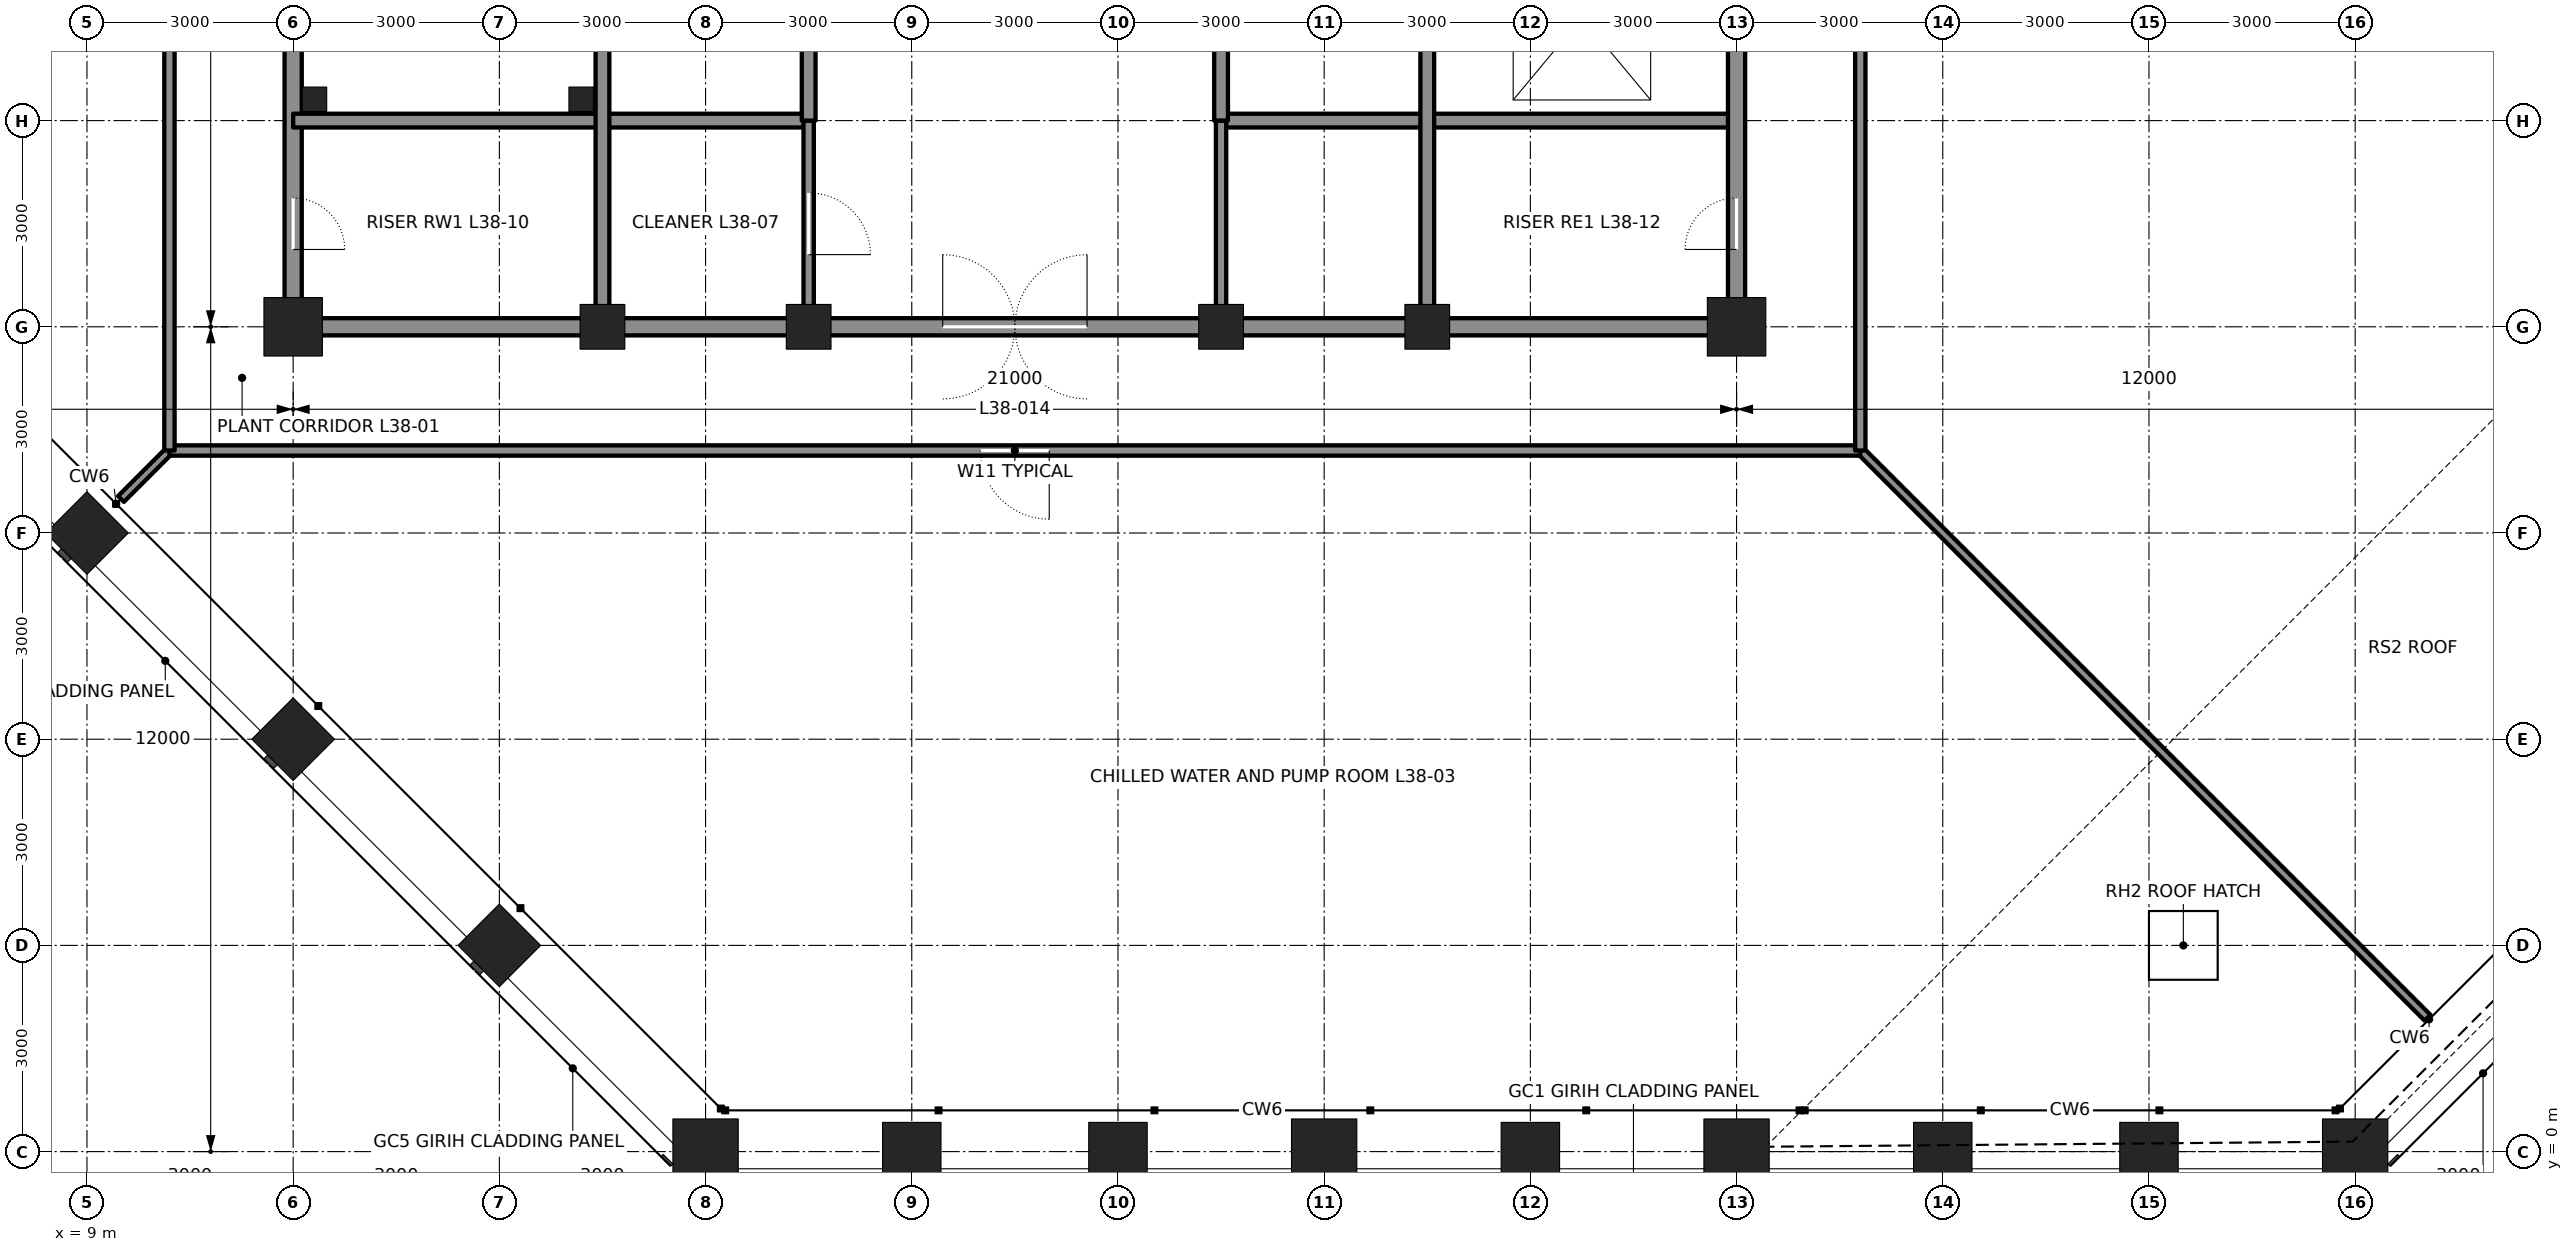
"""IFC4 building model, lengths in metres.
Left out: names, types, materials, properties, quantities, classifications, styles, units other than length and angle.
Written with IfcOpenShell. Run it as: python <this file> out.ifc"""

import sys

from ifc_helpers import new_model, si_unit, direction, frame, frame_2d, origin, origin_2d, place, context, subcontext, project, spatial, rectangle, hollow_rectangle, extrude, element, fill, save


model = new_model("IFC4")
c1 = context("Model", 3, precision=1e-05, world=origin(), true_north=direction((0.0, 1.0)))
c2 = subcontext(c1, "Body", "Model", "MODEL_VIEW")
j1 = project(units=[si_unit("LENGTHUNIT", "METRE"), si_unit("PLANEANGLEUNIT", "RADIAN")], contexts=[c1])
p1 = place(None, origin())
s1 = spatial("IfcSite", under=j1, at=p1, CompositionType="ELEMENT")
p2 = place(p1, origin())
s2 = spatial("IfcBuilding", under=s1, at=p2, CompositionType="ELEMENT")
p3 = place(p2, frame((0.0, 0.0, 174.0)))
s3 = spatial("IfcBuildingStorey", under=s2, at=p3, CompositionType="ELEMENT", Elevation=174.0)
p4 = place(p3, frame((18.0, 0.0, 0.0), z_axis=(0.0, 0.0, 1.0), x_axis=(0.0, -1.0, 0.0)))
e1 = element("IfcColumn", 1, at=p4, inside=s3, PredefinedType="COLUMN", context=c2, shape_type="SweptSolid", body=[
    extrude(hollow_rectangle(XDim=0.95, YDim=0.95, WallThickness=0.095, at=origin_2d()), origin(), (0.0, 0.0, 1.0), 6.0),
])
for number, where, z_axis, x_axis in (
    (2, (21.0, 0.0, 0.0), (0.0, 0.0, 1.0), (0.0, -1.0, 0.0)),
    (3, (24.0, 0.0, 0.0), (0.0, 0.0, 1.0), (0.0, -1.0, 0.0)),
):
    element("IfcColumn", number, at=place(p3, frame(where, z_axis=z_axis, x_axis=x_axis)), inside=s3, PredefinedType="COLUMN", context=c2, shape_type="SweptSolid", body=[
        extrude(hollow_rectangle(XDim=0.85, YDim=0.85, WallThickness=0.085, at=origin_2d()), origin(), (0.0, 0.0, 1.0), 6.0),
    ])
p5 = place(p3, frame((27.0, 0.0, 0.0), z_axis=(0.0, 0.0, 1.0), x_axis=(0.0, -1.0, 0.0)))
e4 = element("IfcColumn", 4, at=p5, inside=s3, PredefinedType="COLUMN", context=c2, shape_type="SweptSolid", body=[
    extrude(hollow_rectangle(XDim=0.95, YDim=0.95, WallThickness=0.11, at=origin_2d()), origin(), (0.0, 0.0, 1.0), 6.0),
])
p6 = place(p3, frame((30.0, 0.0, 0.0), z_axis=(0.0, 0.0, 1.0), x_axis=(0.0, -1.0, 0.0)))
e5 = element("IfcColumn", 5, at=p6, inside=s3, PredefinedType="COLUMN", context=c2, shape_type="SweptSolid", body=[
    extrude(hollow_rectangle(XDim=0.85, YDim=0.85, WallThickness=0.085, at=origin_2d()), origin(), (0.0, 0.0, 1.0), 6.0),
])
p7 = place(p3, frame((33.0, 0.0, 0.0), z_axis=(0.0, 0.0, 1.0), x_axis=(0.0, -1.0, 0.0)))
e6 = element("IfcColumn", 6, at=p7, inside=s3, PredefinedType="COLUMN", context=c2, shape_type="SweptSolid", body=[
    extrude(hollow_rectangle(XDim=0.95, YDim=0.95, WallThickness=0.11, at=origin_2d()), origin(), (0.0, 0.0, 1.0), 6.0),
])
p8 = place(p3, frame((36.0, 0.0, 0.0), z_axis=(0.0, 0.0, 1.0), x_axis=(0.0, -1.0, 0.0)))
e7 = element("IfcColumn", 7, at=p8, inside=s3, PredefinedType="COLUMN", context=c2, shape_type="SweptSolid", body=[
    extrude(hollow_rectangle(XDim=0.85, YDim=0.85, WallThickness=0.085, at=origin_2d()), origin(), (0.0, 0.0, 1.0), 4.149),
])
p9 = place(p3, frame((39.0, 0.0, 0.0), z_axis=(0.0, 0.0, 1.0), x_axis=(0.0, -1.0, 0.0)))
e8 = element("IfcColumn", 8, at=p9, inside=s3, PredefinedType="COLUMN", context=c2, shape_type="SweptSolid", body=[
    extrude(hollow_rectangle(XDim=0.85, YDim=0.85, WallThickness=0.085, at=origin_2d()), origin(), (0.0, 0.0, 1.0), 3.698),
])
p10 = place(p3, frame((42.0, 0.0, 0.0), z_axis=(0.0, 0.0, 1.0), x_axis=(0.0, -1.0, 0.0)))
e9 = element("IfcColumn", 9, at=p10, inside=s3, PredefinedType="COLUMN", context=c2, shape_type="SweptSolid", body=[
    extrude(hollow_rectangle(XDim=0.95, YDim=0.95, WallThickness=0.095, at=origin_2d()), origin(), (0.0, 0.0, 1.0), 3.247),
])
for number, where, z_axis, x_axis in (
    (10, (9.0, 9.0, 0.0), (0.0, 0.0, 1.0), (-0.707, -0.707, 0.0)),
    (11, (12.0, 6.0, 0.0), (0.0, 0.0, 1.0), (-0.707, -0.707, 0.0)),
    (12, (15.0, 3.0, 0.0), (0.0, 0.0, 1.0), (-0.707, -0.707, 0.0)),
    (13, (12.0, 12.0, 0.0), (0.0, 0.0, 1.0), (1.0, 0.0, 0.0)),
):
    element("IfcColumn", number, at=place(p3, frame(where, z_axis=z_axis, x_axis=x_axis)), inside=s3, PredefinedType="COLUMN", context=c2, shape_type="SweptSolid", body=[
        extrude(hollow_rectangle(XDim=0.85, YDim=0.85, WallThickness=0.085, at=origin_2d()), origin(), (0.0, 0.0, 1.0), 6.0),
    ])
for number, where, z_axis, x_axis in (
    (14, (16.5, 12.0, 0.0), (0.0, 0.0, 1.0), (1.0, 0.0, 0.0)),
    (15, (19.5, 12.0, 0.0), (0.0, 0.0, 1.0), (1.0, 0.0, 0.0)),
    (16, (25.5, 12.0, 0.0), (0.0, 0.0, 1.0), (1.0, 0.0, 0.0)),
    (17, (28.5, 12.0, 0.0), (0.0, 0.0, 1.0), (1.0, 0.0, 0.0)),
):
    element("IfcColumn", number, at=place(p3, frame(where, z_axis=z_axis, x_axis=x_axis)), inside=s3, PredefinedType="COLUMN", context=c2, shape_type="SweptSolid", body=[
        extrude(hollow_rectangle(XDim=0.65, YDim=0.65, WallThickness=0.065, at=origin_2d()), origin(), (0.0, 0.0, 1.0), 6.0),
    ])
p11 = place(p3, frame((33.0, 12.0, 0.0), z_axis=(0.0, 0.0, 1.0), x_axis=(1.0, 0.0, 0.0)))
e18 = element("IfcColumn", 18, at=p11, inside=s3, PredefinedType="COLUMN", context=c2, shape_type="SweptSolid", body=[
    extrude(hollow_rectangle(XDim=0.85, YDim=0.85, WallThickness=0.085, at=origin_2d()), origin(), (0.0, 0.0, 1.0), 6.0),
])
p12 = place(p3, frame((12.0, 12.25, 0.0), z_axis=(0.0, 0.0, 1.0), x_axis=(0.0, 1.0, 0.0)))
e19 = element("IfcWall", 19, at=p12, inside=s3, PredefinedType="SOLIDWALL", context=c2, shape_type="SweptSolid", body=[
    extrude(rectangle(XDim=8.5, YDim=0.25, at=frame_2d((4.25, 0.0))), origin(), (0.0, 0.0, 1.0), 4.913),
])
p13 = place(p12, frame((0.875, 0.0, 0.0)))
e20 = element("IfcOpeningElement", 20, at=p13, cuts=e19, PredefinedType="OPENING", context=c2, shape_type="SweptSolid", body=[
    extrude(rectangle(XDim=0.75, YDim=2.1, at=frame_2d((0.375, 1.05))), frame((0.0, 0.135, 0.0), z_axis=(0.0, -1.0, 0.0), x_axis=(1.0, 0.0, 0.0)), (0.0, 0.0, 1.0), 0.27),
])
p14 = place(p3, frame((12.25, 12.0, 0.0), z_axis=(0.0, 0.0, 1.0), x_axis=(1.0, 0.0, 0.0)))
e21 = element("IfcWall", 21, at=p14, inside=s3, PredefinedType="SOLIDWALL", context=c2, shape_type="SweptSolid", body=[
    extrude(rectangle(XDim=4.0, YDim=0.25, at=frame_2d((2.0, 0.0))), origin(), (0.0, 0.0, 1.0), 4.981),
])
for number, where, z_axis, x_axis in (
    (22, (16.75, 12.0, 0.0), (0.0, 0.0, 1.0), (1.0, 0.0, 0.0)),
    (23, (25.75, 12.0, 0.0), (0.0, 0.0, 1.0), (1.0, 0.0, 0.0)),
):
    element("IfcWall", number, at=place(p3, frame(where, z_axis=z_axis, x_axis=x_axis)), inside=s3, PredefinedType="SOLIDWALL", context=c2, shape_type="SweptSolid", body=[
        extrude(rectangle(XDim=2.5, YDim=0.25, at=frame_2d((1.25, 0.0))), origin(), (0.0, 0.0, 1.0), 4.981),
    ])
p15 = place(p3, frame((28.75, 12.0, 0.0), z_axis=(0.0, 0.0, 1.0), x_axis=(1.0, 0.0, 0.0)))
e24 = element("IfcWall", 24, at=p15, inside=s3, PredefinedType="SOLIDWALL", context=c2, shape_type="SweptSolid", body=[
    extrude(rectangle(XDim=4.0, YDim=0.25, at=frame_2d((2.0, 0.0))), origin(), (0.0, 0.0, 1.0), 4.981),
])
for number, where, z_axis, x_axis in (
    (25, (12.0, 15.0, 0.0), (0.0, 0.0, 1.0), (1.0, 0.0, 0.0)),
    (26, (25.5, 15.0, 0.0), (0.0, 0.0, 1.0), (1.0, 0.0, 0.0)),
):
    element("IfcWall", number, at=place(p3, frame(where, z_axis=z_axis, x_axis=x_axis)), inside=s3, PredefinedType="SOLIDWALL", context=c2, shape_type="SweptSolid", body=[
        extrude(rectangle(XDim=7.5, YDim=0.2, at=frame_2d((3.75, 0.0))), origin(), (0.0, 0.0, 1.0), 5.84),
    ])
p16 = place(p3, frame((16.5, 12.25, 0.0), z_axis=(0.0, 0.0, 1.0), x_axis=(0.0, 1.0, 0.0)))
e27 = element("IfcWall", 27, at=p16, inside=s3, PredefinedType="SOLIDWALL", context=c2, shape_type="SweptSolid", body=[
    extrude(rectangle(XDim=8.5, YDim=0.2, at=frame_2d((4.25, 0.0))), origin(), (0.0, 0.0, 1.0), 4.913),
])
p17 = place(p3, frame((19.5, 12.25, 0.0), z_axis=(0.0, 0.0, 1.0), x_axis=(0.0, 1.0, 0.0)))
e28 = element("IfcWall", 28, at=p17, inside=s3, PredefinedType="PARTITIONING", context=c2, shape_type="SweptSolid", body=[
    extrude(rectangle(XDim=2.75, YDim=0.15, at=frame_2d((1.375, 0.0))), origin(), (0.0, 0.0, 1.0), 4.865),
])
p18 = place(p17, frame((0.8, 0.0, 0.0)))
e29 = element("IfcOpeningElement", 29, at=p18, cuts=e28, PredefinedType="OPENING", context=c2, shape_type="SweptSolid", body=[
    extrude(rectangle(XDim=0.9, YDim=2.1, at=frame_2d((0.45, 1.05))), frame((0.0, 0.085, 0.0), z_axis=(0.0, -1.0, 0.0), x_axis=(1.0, 0.0, 0.0)), (0.0, 0.0, 1.0), 0.17),
])
p19 = place(p3, frame((19.5, 15.0, 0.0), z_axis=(0.0, 0.0, 1.0), x_axis=(0.0, 1.0, 0.0)))
e30 = element("IfcWall", 30, at=p19, inside=s3, PredefinedType="SOLIDWALL", context=c2, shape_type="SweptSolid", body=[
    extrude(rectangle(XDim=12.0, YDim=0.2, at=frame_2d((6.0, 0.0))), origin(), (0.0, 0.0, 1.0), 4.865),
])
p20 = place(p3, frame((25.5, 12.25, 0.0), z_axis=(0.0, 0.0, 1.0), x_axis=(0.0, 1.0, 0.0)))
e31 = element("IfcWall", 31, at=p20, inside=s3, PredefinedType="PARTITIONING", context=c2, shape_type="SweptSolid", body=[
    extrude(rectangle(XDim=2.75, YDim=0.15, at=frame_2d((1.375, 0.0))), origin(), (0.0, 0.0, 1.0), 4.865),
])
p21 = place(p3, frame((25.5, 15.0, 0.0), z_axis=(0.0, 0.0, 1.0), x_axis=(0.0, 1.0, 0.0)))
e32 = element("IfcWall", 32, at=p21, inside=s3, PredefinedType="SOLIDWALL", context=c2, shape_type="SweptSolid", body=[
    extrude(rectangle(XDim=12.0, YDim=0.2, at=frame_2d((6.0, 0.0))), origin(), (0.0, 0.0, 1.0), 4.865),
])
p22 = place(p3, frame((28.5, 12.25, 0.0), z_axis=(0.0, 0.0, 1.0), x_axis=(0.0, 1.0, 0.0)))
e33 = element("IfcWall", 33, at=p22, inside=s3, PredefinedType="SOLIDWALL", context=c2, shape_type="SweptSolid", body=[
    extrude(rectangle(XDim=8.5, YDim=0.2, at=frame_2d((4.25, 0.0))), origin(), (0.0, 0.0, 1.0), 4.913),
])
p23 = place(p3, frame((33.0, 12.25, 0.0), z_axis=(0.0, 0.0, 1.0), x_axis=(0.0, 1.0, 0.0)))
e34 = element("IfcWall", 34, at=p23, inside=s3, PredefinedType="SOLIDWALL", context=c2, shape_type="SweptSolid", body=[
    extrude(rectangle(XDim=8.5, YDim=0.25, at=frame_2d((4.25, 0.0))), origin(), (0.0, 0.0, 1.0), 4.913),
])
p24 = place(p23, frame((6.65, 0.0, 0.0)))
e35 = element("IfcOpeningElement", 35, at=p24, cuts=e34, PredefinedType="OPENING", context=c2, shape_type="SweptSolid", body=[
    extrude(rectangle(XDim=1.2, YDim=2.1, at=frame_2d((0.6, 1.05))), frame((0.0, 0.135, 0.0), z_axis=(0.0, -1.0, 0.0), x_axis=(1.0, 0.0, 0.0)), (0.0, 0.0, 1.0), 0.27),
])
p25 = place(p23, frame((0.875, 0.0, 0.0)))
e36 = element("IfcOpeningElement", 36, at=p25, cuts=e34, PredefinedType="OPENING", context=c2, shape_type="SweptSolid", body=[
    extrude(rectangle(XDim=0.75, YDim=2.1, at=frame_2d((0.375, 1.05))), frame((0.0, 0.135, 0.0), z_axis=(0.0, -1.0, 0.0), x_axis=(1.0, 0.0, 0.0)), (0.0, 0.0, 1.0), 0.27),
])
p26 = place(p3, frame((19.5, 12.0, 0.0), z_axis=(0.0, 0.0, 1.0), x_axis=(1.0, 0.0, 0.0)))
e37 = element("IfcWall", 37, at=p26, inside=s3, PredefinedType="SOLIDWALL", context=c2, shape_type="SweptSolid", body=[
    extrude(rectangle(XDim=6.0, YDim=0.25, at=frame_2d((3.0, 0.0))), origin(), (0.0, 0.0, 1.0), 4.981),
])
p27 = place(p26, frame((1.95, 0.0, 0.0)))
e38 = element("IfcOpeningElement", 38, at=p27, cuts=e37, PredefinedType="OPENING", context=c2, shape_type="SweptSolid", body=[
    extrude(rectangle(XDim=2.1, YDim=2.4, at=frame_2d((1.05, 1.2))), frame((0.0, 0.135, 0.0), z_axis=(0.0, -1.0, 0.0), x_axis=(1.0, 0.0, 0.0)), (0.0, 0.0, 1.0), 0.27),
])
p28 = place(p3, frame((10.2, 10.2, 0.0), z_axis=(0.0, 0.0, 1.0), x_axis=(-0.707106781187, -0.707106781187, 0.0)))
e39 = element("IfcWall", 39, at=p28, inside=s3, PredefinedType="PARTITIONING", context=c2, shape_type="SweptSolid", body=[
    extrude(rectangle(XDim=0.997, YDim=0.12, at=frame_2d((0.499, 0.0))), origin(), (0.0, 0.0, 1.0), 5.84),
])
p29 = place(p3, frame((34.8, 10.2, 0.0), z_axis=(0.0, 0.0, 1.0), x_axis=(0.707106781187, -0.707106781187, 0.0)))
e40 = element("IfcWall", 40, at=p29, inside=s3, PredefinedType="PARTITIONING", context=c2, shape_type="SweptSolid", body=[
    extrude(rectangle(XDim=11.671, YDim=0.12, at=frame_2d((5.836, 0.0))), origin(), (0.0, 0.0, 1.0), 5.84),
])
p30 = place(p3, frame((10.2, 10.2, 0.0), z_axis=(0.0, 0.0, 1.0), x_axis=(1.0, 0.0, 0.0)))
e41 = element("IfcWall", 41, at=p30, inside=s3, PredefinedType="PARTITIONING", context=c2, shape_type="SweptSolid", body=[
    extrude(rectangle(XDim=24.6, YDim=0.15, at=frame_2d((12.3, 0.0))), origin(), (0.0, 0.0, 1.0), 5.84),
])
p31 = place(p30, frame((11.8, 0.0, 0.0)))
e42 = element("IfcOpeningElement", 42, at=p31, cuts=e41, PredefinedType="OPENING", context=c2, shape_type="SweptSolid", body=[
    extrude(rectangle(XDim=1.0, YDim=2.4, at=frame_2d((0.5, 1.2))), frame((0.0, 0.085, 0.0), z_axis=(0.0, -1.0, 0.0), x_axis=(1.0, 0.0, 0.0)), (0.0, 0.0, 1.0), 0.17),
])
p32 = place(p3, frame((10.2, 10.2, 0.0), z_axis=(0.0, 0.0, 1.0), x_axis=(0.0, 1.0, 0.0)))
e43 = element("IfcWall", 43, at=p32, inside=s3, PredefinedType="PARTITIONING", context=c2, shape_type="SweptSolid", body=[
    extrude(rectangle(XDim=24.6, YDim=0.15, at=frame_2d((12.3, 0.0))), origin(), (0.0, 0.0, 1.0), 5.84),
])
p33 = place(p32, frame((11.8, 0.0, 0.0)))
e44 = element("IfcOpeningElement", 44, at=p33, cuts=e43, PredefinedType="OPENING", context=c2, shape_type="SweptSolid", body=[
    extrude(rectangle(XDim=1.0, YDim=2.4, at=frame_2d((0.5, 1.2))), frame((0.0, 0.085, 0.0), z_axis=(0.0, -1.0, 0.0), x_axis=(1.0, 0.0, 0.0)), (0.0, 0.0, 1.0), 0.17),
])
p34 = place(p3, frame((34.8, 10.2, 0.0), z_axis=(0.0, 0.0, 1.0), x_axis=(0.0, 1.0, 0.0)))
e45 = element("IfcWall", 45, at=p34, inside=s3, PredefinedType="PARTITIONING", context=c2, shape_type="SweptSolid", body=[
    extrude(rectangle(XDim=24.6, YDim=0.15, at=frame_2d((12.3, 0.0))), origin(), (0.0, 0.0, 1.0), 5.84),
])
p35 = place(p34, frame((11.8, 0.0, 0.0)))
e46 = element("IfcOpeningElement", 46, at=p35, cuts=e45, PredefinedType="OPENING", context=c2, shape_type="SweptSolid", body=[
    extrude(rectangle(XDim=1.0, YDim=2.4, at=frame_2d((0.5, 1.2))), frame((0.0, 0.085, 0.0), z_axis=(0.0, -1.0, 0.0), x_axis=(1.0, 0.0, 0.0)), (0.0, 0.0, 1.0), 0.17),
])
for number, where, z_axis, x_axis in (
    (47, (12.31, 15.31, 0.0), (0.0, 0.0, 1.0), (1.0, 0.0, 0.0)),
    (48, (16.19, 15.31, 0.0), (0.0, 0.0, 1.0), (1.0, 0.0, 0.0)),
):
    element("IfcColumn", number, at=place(p3, frame(where, z_axis=z_axis, x_axis=x_axis)), inside=s3, PredefinedType="COLUMN", context=c2, shape_type="SweptSolid", body=[
        extrude(hollow_rectangle(XDim=0.356, YDim=0.356, WallThickness=0.015, at=origin_2d()), origin(), (0.0, 0.0, 1.0), 6.0),
    ])
p36 = place(p3, frame((39.5, 3.0, 4.969)))
p37 = place(p36, frame((0.0, 0.0, 0.454)))
e49 = element("IfcDoor", 49, at=p37, inside=s3, OperationType="SINGLE_SWING_LEFT", PredefinedType="TRAPDOOR", context=c2, shape_type="SweptSolid", body=[
    extrude(rectangle(XDim=1.0, YDim=1.0, at=origin_2d()), origin(), (0.0, 0.0, 1.0), 0.05),
])
p38 = place(p27, origin())
e50 = element("IfcDoor", 50, at=p38, inside=s3, OperationType="DOUBLE_DOOR_DOUBLE_SWING", PredefinedType="DOOR", context=c2, shape_type="SweptSolid", body=[
    extrude(rectangle(XDim=2.1, YDim=2.4, at=frame_2d((1.05, 1.2))), frame((0.0, 0.025, 0.0), z_axis=(0.0, -1.0, 0.0), x_axis=(1.0, 0.0, 0.0)), (0.0, 0.0, 1.0), 0.05),
])
fill(e38, e50)
p39 = place(p13, frame((0.75, 0.0, 0.0), z_axis=(0.0, 0.0, 1.0), x_axis=(-1.0, 0.0, 0.0)))
e51 = element("IfcDoor", 51, at=p39, inside=s3, OperationType="SINGLE_SWING_RIGHT", PredefinedType="DOOR", context=c2, shape_type="SweptSolid", body=[
    extrude(rectangle(XDim=0.75, YDim=2.1, at=frame_2d((0.375, 1.05))), frame((0.0, 0.025, 0.0), z_axis=(0.0, -1.0, 0.0), x_axis=(1.0, 0.0, 0.0)), (0.0, 0.0, 1.0), 0.05),
])
fill(e20, e51)
p40 = place(p25, origin())
e52 = element("IfcDoor", 52, at=p40, inside=s3, OperationType="SINGLE_SWING_LEFT", PredefinedType="DOOR", context=c2, shape_type="SweptSolid", body=[
    extrude(rectangle(XDim=0.75, YDim=2.1, at=frame_2d((0.375, 1.05))), frame((0.0, 0.025, 0.0), z_axis=(0.0, -1.0, 0.0), x_axis=(1.0, 0.0, 0.0)), (0.0, 0.0, 1.0), 0.05),
])
fill(e36, e52)
p41 = place(p18, frame((0.9, 0.0, 0.0), z_axis=(0.0, 0.0, 1.0), x_axis=(-1.0, 0.0, 0.0)))
e53 = element("IfcDoor", 53, at=p41, inside=s3, OperationType="SINGLE_SWING_RIGHT", PredefinedType="DOOR", context=c2, shape_type="SweptSolid", body=[
    extrude(rectangle(XDim=0.9, YDim=2.1, at=frame_2d((0.45, 1.05))), frame((0.0, 0.025, 0.0), z_axis=(0.0, -1.0, 0.0), x_axis=(1.0, 0.0, 0.0)), (0.0, 0.0, 1.0), 0.05),
])
fill(e29, e53)
p42 = place(p31, frame((1.0, 0.0, 0.0), z_axis=(0.0, 0.0, 1.0), x_axis=(-1.0, 0.0, 0.0)))
e54 = element("IfcDoor", 54, at=p42, inside=s3, OperationType="SINGLE_SWING_LEFT", PredefinedType="DOOR", context=c2, shape_type="SweptSolid", body=[
    extrude(rectangle(XDim=1.0, YDim=2.4, at=frame_2d((0.5, 1.2))), frame((0.0, 0.025, 0.0), z_axis=(0.0, -1.0, 0.0), x_axis=(1.0, 0.0, 0.0)), (0.0, 0.0, 1.0), 0.05),
])
fill(e42, e54)
save(model, sys.argv[1])
